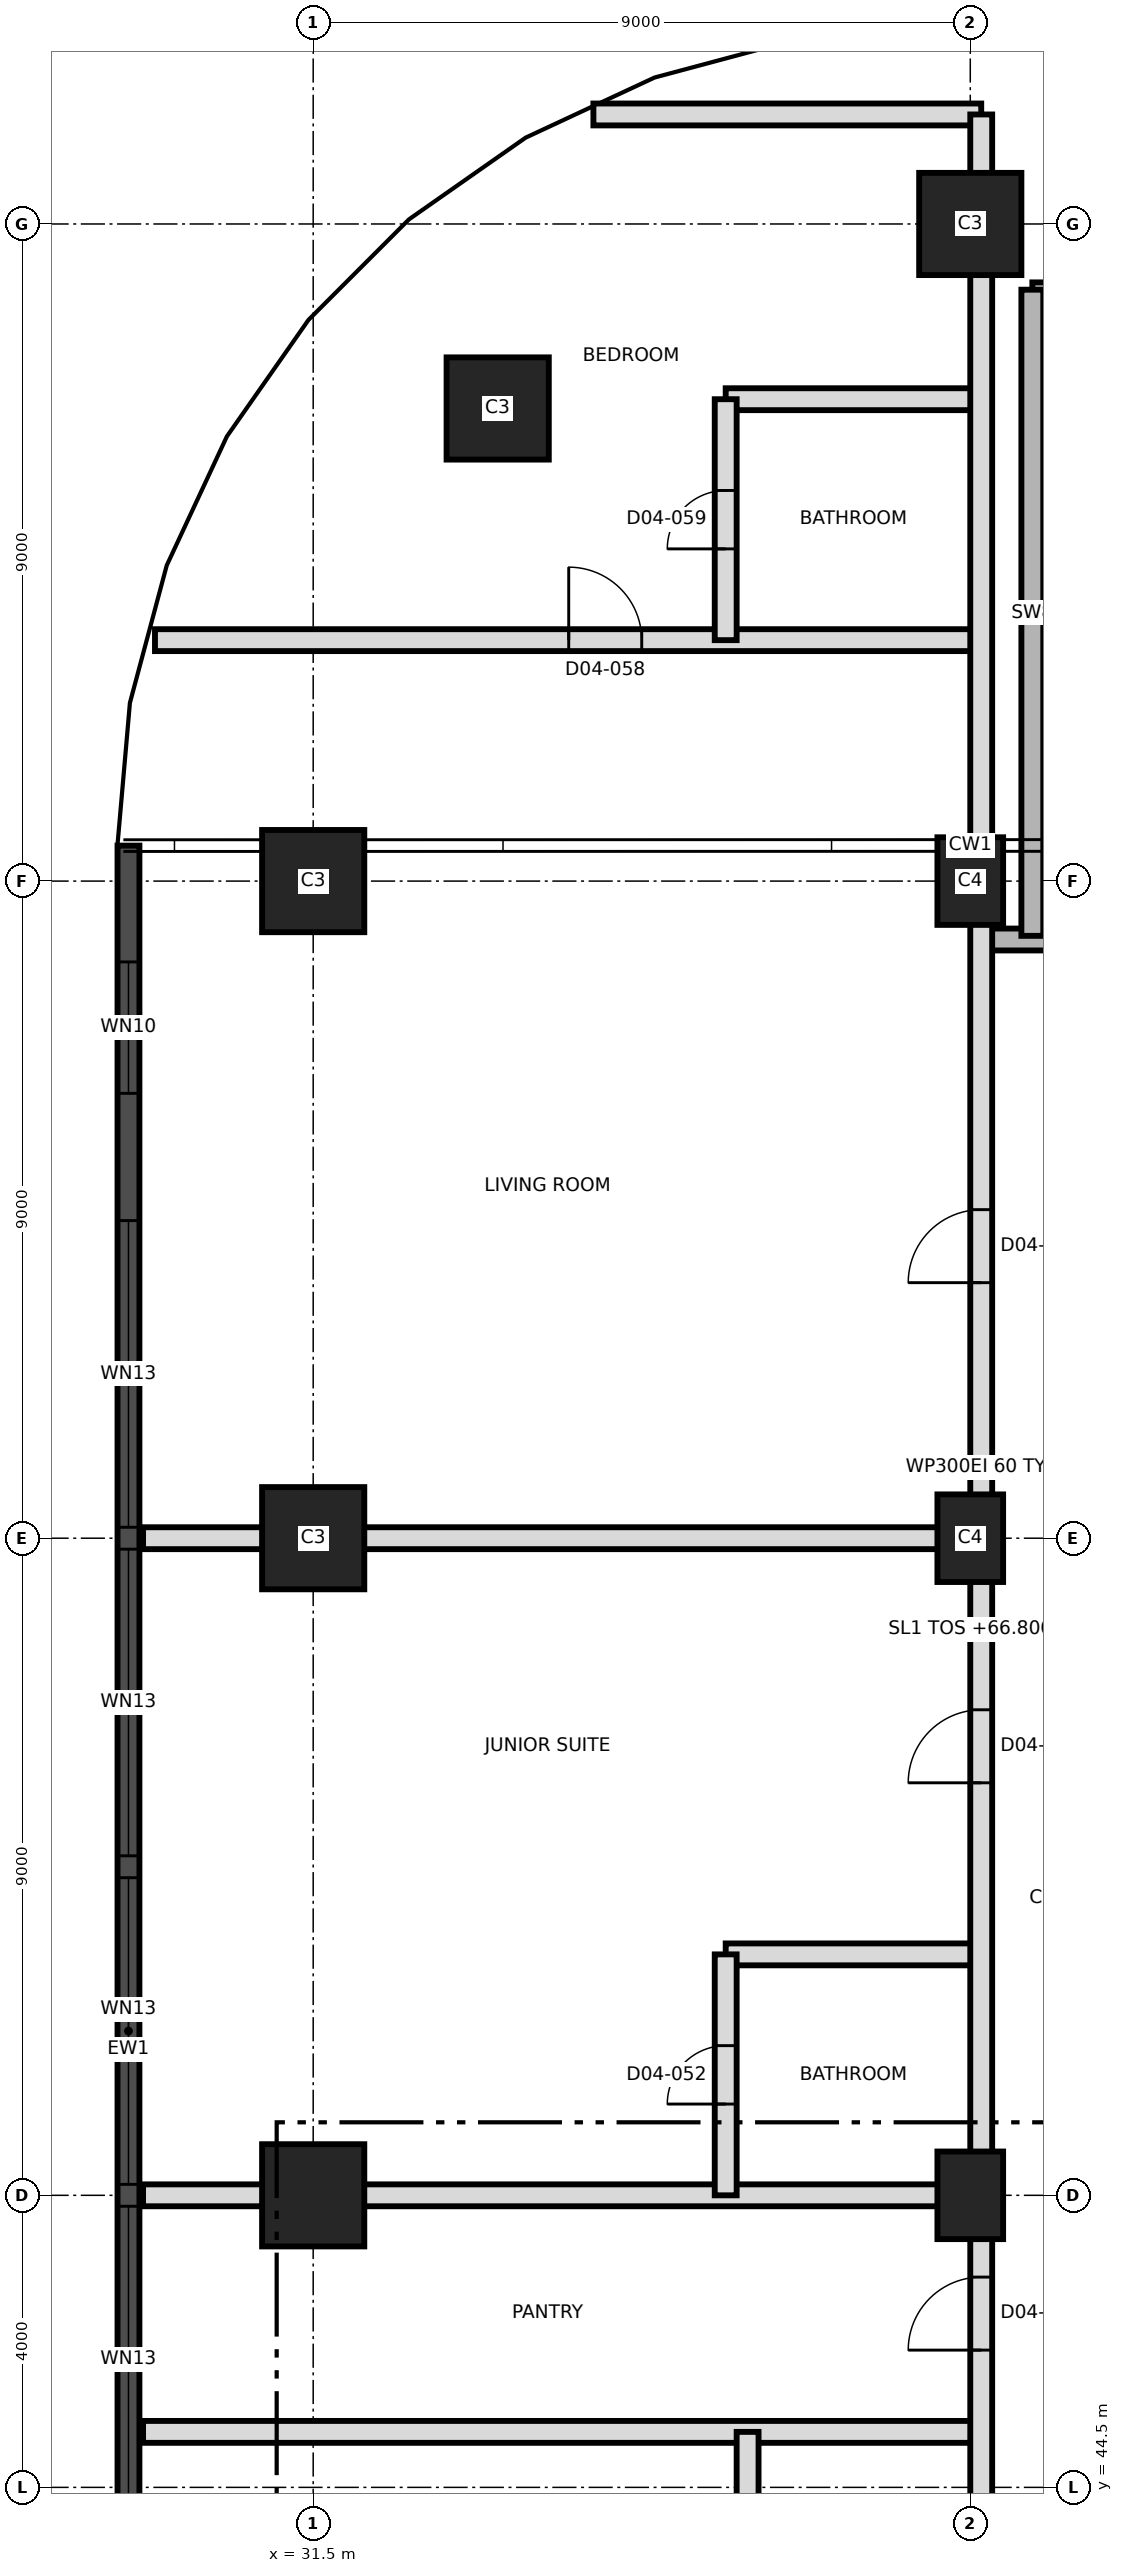
"""IFC4 building model, lengths in metres.
Left out: names, types, materials, properties, quantities, classifications, styles, units other than length and angle.
Written with IfcOpenShell. Run it as: python <this file> out.ifc"""

import sys

from ifc_helpers import new_model, si_unit, direction, frame, frame_2d, origin, origin_2d, place, context, subcontext, project, spatial, rectangle, extrude, element, fill, save


model = new_model("IFC4")
c1 = context("Model", 3, precision=1e-05, world=origin(), true_north=direction((0.0, 1.0)))
c2 = subcontext(c1, "Body", "Model", "MODEL_VIEW")
j1 = project(units=[si_unit("LENGTHUNIT", "METRE"), si_unit("PLANEANGLEUNIT", "RADIAN")], contexts=[c1])
p1 = place(None, origin())
s1 = spatial("IfcSite", under=j1, at=p1, CompositionType="ELEMENT")
p2 = place(p1, origin())
s2 = spatial("IfcBuilding", under=s1, at=p2, CompositionType="ELEMENT")
p3 = place(p2, frame((0.0, 0.0, 66.8)))
s3 = spatial("IfcBuildingStorey", under=s2, at=p3, CompositionType="ELEMENT", Elevation=66.8)
p4 = place(p3, frame((31.5, 48.5, 0.0), z_axis=(0.0, 0.0, 1.0), x_axis=(1.0, 0.0, 0.0)))
e1 = element("IfcColumn", 1, at=p4, inside=s3, PredefinedType="COLUMN", context=c2, shape_type="SweptSolid", body=[
    extrude(rectangle(XDim=1.4, YDim=1.4, at=origin_2d()), origin(), (0.0, 0.0, 1.0), 3.7),
])
p5 = place(p3, frame((40.5, 48.5, 0.0), z_axis=(0.0, 0.0, 1.0), x_axis=(0.0, 1.0, 0.0)))
e2 = element("IfcColumn", 2, at=p5, inside=s3, PredefinedType="COLUMN", context=c2, shape_type="SweptSolid", body=[
    extrude(rectangle(XDim=1.2, YDim=0.9, at=origin_2d()), origin(), (0.0, 0.0, 1.0), 3.7),
])
p6 = place(p3, frame((31.5, 57.5, 0.0), z_axis=(0.0, 0.0, 1.0), x_axis=(1.0, 0.0, 0.0)))
e3 = element("IfcColumn", 3, at=p6, inside=s3, PredefinedType="COLUMN", context=c2, shape_type="SweptSolid", body=[
    extrude(rectangle(XDim=1.4, YDim=1.4, at=origin_2d()), origin(), (0.0, 0.0, 1.0), 3.7),
])
p7 = place(p3, frame((40.5, 57.5, 0.0), z_axis=(0.0, 0.0, 1.0), x_axis=(0.0, 1.0, 0.0)))
e4 = element("IfcColumn", 4, at=p7, inside=s3, PredefinedType="COLUMN", context=c2, shape_type="SweptSolid", body=[
    extrude(rectangle(XDim=1.2, YDim=0.9, at=origin_2d()), origin(), (0.0, 0.0, 1.0), 3.7),
])
p8 = place(p3, frame((31.5, 66.5, 0.0), z_axis=(0.0, 0.0, 1.0), x_axis=(1.0, 0.0, 0.0)))
e5 = element("IfcColumn", 5, at=p8, inside=s3, PredefinedType="COLUMN", context=c2, shape_type="SweptSolid", body=[
    extrude(rectangle(XDim=1.4, YDim=1.4, at=origin_2d()), origin(), (0.0, 0.0, 1.0), 3.7),
])
p9 = place(p3, frame((40.5, 66.5, 0.0), z_axis=(0.0, 0.0, 1.0), x_axis=(0.0, 1.0, 0.0)))
e6 = element("IfcColumn", 6, at=p9, inside=s3, PredefinedType="COLUMN", context=c2, shape_type="SweptSolid", body=[
    extrude(rectangle(XDim=1.2, YDim=0.9, at=origin_2d()), origin(), (0.0, 0.0, 1.0), 3.7),
])
for number, where, z_axis, x_axis in (
    (7, (34.027, 72.973, 0.0), (0.0, 0.0, 1.0), (1.0, 0.0, 0.0)),
    (8, (40.5, 75.5, 0.0), (0.0, 0.0, 1.0), (1.0, 0.0, 0.0)),
):
    element("IfcColumn", number, at=place(p3, frame(where, z_axis=z_axis, x_axis=x_axis)), inside=s3, PredefinedType="COLUMN", context=c2, shape_type="SweptSolid", body=[
        extrude(rectangle(XDim=1.4, YDim=1.4, at=origin_2d()), origin(), (0.0, 0.0, 1.0), 3.7),
    ])
p10 = place(p3, frame((28.97, 66.986, 0.0), z_axis=(0.0, 0.0, 1.0), x_axis=(0.0, -1.0, 0.0)))
e9 = element("IfcWall", 9, at=p10, inside=s3, PredefinedType="SOLIDWALL", context=c2, shape_type="SweptSolid", body=[
    extrude(rectangle(XDim=32.976, YDim=0.3, at=frame_2d((16.488, 0.0))), origin(), (0.0, 0.0, 1.0), 3.4),
])
p11 = place(p10, frame((1.593, 0.0, 0.3)))
e10 = element("IfcOpeningElement", 10, at=p11, cuts=e9, PredefinedType="OPENING", context=c2, shape_type="SweptSolid", body=[
    extrude(rectangle(XDim=1.8, YDim=2.4, at=frame_2d((0.9, 1.2))), frame((0.0, 0.16, 0.0), z_axis=(0.0, -1.0, 0.0), x_axis=(1.0, 0.0, 0.0)), (0.0, 0.0, 1.0), 0.32),
])
p12 = place(p10, frame((5.136, 0.0, 0.9)))
e11 = element("IfcOpeningElement", 11, at=p12, cuts=e9, PredefinedType="OPENING", context=c2, shape_type="SweptSolid", body=[
    extrude(rectangle(XDim=4.2, YDim=1.7, at=frame_2d((2.1, 0.85))), frame((0.0, 0.16, 0.0), z_axis=(0.0, -1.0, 0.0), x_axis=(1.0, 0.0, 0.0)), (0.0, 0.0, 1.0), 0.32),
])
p13 = place(p10, frame((9.636, 0.0, 0.9)))
e12 = element("IfcOpeningElement", 12, at=p13, cuts=e9, PredefinedType="OPENING", context=c2, shape_type="SweptSolid", body=[
    extrude(rectangle(XDim=4.2, YDim=1.7, at=frame_2d((2.1, 0.85))), frame((0.0, 0.16, 0.0), z_axis=(0.0, -1.0, 0.0), x_axis=(1.0, 0.0, 0.0)), (0.0, 0.0, 1.0), 0.32),
])
p14 = place(p10, frame((14.136, 0.0, 0.9)))
e13 = element("IfcOpeningElement", 13, at=p14, cuts=e9, PredefinedType="OPENING", context=c2, shape_type="SweptSolid", body=[
    extrude(rectangle(XDim=4.2, YDim=1.7, at=frame_2d((2.1, 0.85))), frame((0.0, 0.16, 0.0), z_axis=(0.0, -1.0, 0.0), x_axis=(1.0, 0.0, 0.0)), (0.0, 0.0, 1.0), 0.32),
])
p15 = place(p10, frame((18.636, 0.0, 0.9)))
e14 = element("IfcOpeningElement", 14, at=p15, cuts=e9, PredefinedType="OPENING", context=c2, shape_type="SweptSolid", body=[
    extrude(rectangle(XDim=4.2, YDim=1.7, at=frame_2d((2.1, 0.85))), frame((0.0, 0.16, 0.0), z_axis=(0.0, -1.0, 0.0), x_axis=(1.0, 0.0, 0.0)), (0.0, 0.0, 1.0), 0.32),
])
p16 = place(p10, frame((23.136, 0.0, 0.9)))
e15 = element("IfcOpeningElement", 15, at=p16, cuts=e9, PredefinedType="OPENING", context=c2, shape_type="SweptSolid", body=[
    extrude(rectangle(XDim=4.2, YDim=1.7, at=frame_2d((2.1, 0.85))), frame((0.0, 0.16, 0.0), z_axis=(0.0, -1.0, 0.0), x_axis=(1.0, 0.0, 0.0)), (0.0, 0.0, 1.0), 0.32),
])
p17 = place(p10, frame((29.331, 0.0, 0.3)))
e16 = element("IfcOpeningElement", 16, at=p17, cuts=e9, PredefinedType="OPENING", context=c2, shape_type="SweptSolid", body=[
    extrude(rectangle(XDim=1.8, YDim=2.4, at=frame_2d((0.9, 1.2))), frame((0.0, 0.16, 0.0), z_axis=(0.0, -1.0, 0.0), x_axis=(1.0, 0.0, 0.0)), (0.0, 0.0, 1.0), 0.32),
])
for number, where, z_axis, x_axis in (
    (17, (29.17, 45.26, 0.0), (0.0, 0.0, 1.0), (1.0, 0.0, 0.0)),
    (18, (29.17, 48.5, 0.0), (0.0, 0.0, 1.0), (1.0, 0.0, 0.0)),
):
    element("IfcWall", number, at=place(p3, frame(where, z_axis=z_axis, x_axis=x_axis)), inside=s3, PredefinedType="PARTITIONING", context=c2, shape_type="SweptSolid", body=[
        extrude(rectangle(XDim=11.48, YDim=0.3, at=frame_2d((5.74, 0.0))), origin(), (0.0, 0.0, 1.0), 3.35),
    ])
p18 = place(p3, frame((37.15, 51.8, 0.0), z_axis=(0.0, 0.0, 1.0), x_axis=(1.0, 0.0, 0.0)))
e19 = element("IfcWall", 19, at=p18, inside=s3, PredefinedType="PARTITIONING", context=c2, shape_type="SweptSolid", body=[
    extrude(rectangle(XDim=3.5, YDim=0.3, at=frame_2d((1.75, 0.0))), origin(), (0.0, 0.0, 1.0), 3.4),
])
p19 = place(p3, frame((29.17, 57.5, 0.0), z_axis=(0.0, 0.0, 1.0), x_axis=(1.0, 0.0, 0.0)))
e20 = element("IfcWall", 20, at=p19, inside=s3, PredefinedType="PARTITIONING", context=c2, shape_type="SweptSolid", body=[
    extrude(rectangle(XDim=11.48, YDim=0.3, at=frame_2d((5.74, 0.0))), origin(), (0.0, 0.0, 1.0), 3.35),
])
p20 = place(p3, frame((40.65, 65.7, 0.0), z_axis=(0.0, 0.0, 1.0), x_axis=(1.0, 0.0, 0.0)))
e21 = element("IfcWall", 21, at=p20, inside=s3, PredefinedType="SHEAR", context=c2, shape_type="SweptSolid", body=[
    extrude(rectangle(XDim=6.2, YDim=0.3, at=frame_2d((3.1, 0.0))), origin(), (0.0, 0.0, 1.0), 3.4),
])
p21 = place(p20, frame((1.1, 0.0, 0.0)))
e22 = element("IfcOpeningElement", 22, at=p21, cuts=e21, PredefinedType="OPENING", context=c2, shape_type="SweptSolid", body=[
    extrude(rectangle(XDim=1.2, YDim=2.1, at=frame_2d((0.6, 1.05))), frame((0.0, 0.16, 0.0), z_axis=(0.0, -1.0, 0.0), x_axis=(1.0, 0.0, 0.0)), (0.0, 0.0, 1.0), 0.32),
])
p22 = place(p3, frame((29.333, 69.8, 0.0), z_axis=(0.0, 0.0, 1.0), x_axis=(1.0, 0.0, 0.0)))
e23 = element("IfcWall", 23, at=p22, inside=s3, PredefinedType="PARTITIONING", context=c2, shape_type="SweptSolid", body=[
    extrude(rectangle(XDim=11.317, YDim=0.3, at=frame_2d((5.658, 0.0))), origin(), (0.0, 0.0, 1.0), 3.35),
])
p23 = place(p22, frame((5.667, 0.0, 0.0)))
e24 = element("IfcOpeningElement", 24, at=p23, cuts=e23, PredefinedType="OPENING", context=c2, shape_type="SweptSolid", body=[
    extrude(rectangle(XDim=1.0, YDim=2.1, at=frame_2d((0.5, 1.05))), frame((0.0, 0.16, 0.0), z_axis=(0.0, -1.0, 0.0), x_axis=(1.0, 0.0, 0.0)), (0.0, 0.0, 1.0), 0.32),
])
p24 = place(p3, frame((37.15, 73.1, 0.0), z_axis=(0.0, 0.0, 1.0), x_axis=(1.0, 0.0, 0.0)))
e25 = element("IfcWall", 25, at=p24, inside=s3, PredefinedType="PARTITIONING", context=c2, shape_type="SweptSolid", body=[
    extrude(rectangle(XDim=3.5, YDim=0.3, at=frame_2d((1.75, 0.0))), origin(), (0.0, 0.0, 1.0), 3.4),
])
p25 = place(p3, frame((41.35, 74.55, 0.0), z_axis=(0.0, 0.0, 1.0), x_axis=(1.0, 0.0, 0.0)))
e26 = element("IfcWall", 26, at=p25, inside=s3, PredefinedType="SHEAR", context=c2, shape_type="SweptSolid", body=[
    extrude(rectangle(XDim=3.0, YDim=0.3, at=frame_2d((1.5, 0.0))), origin(), (0.0, 0.0, 1.0), 3.4),
])
p26 = place(p3, frame((35.338, 77.0, 0.0), z_axis=(0.0, 0.0, 1.0), x_axis=(1.0, 0.0, 0.0)))
e27 = element("IfcWall", 27, at=p26, inside=s3, PredefinedType="PARTITIONING", context=c2, shape_type="SweptSolid", body=[
    extrude(rectangle(XDim=5.312, YDim=0.3, at=frame_2d((2.656, 0.0))), origin(), (0.0, 0.0, 1.0), 3.35),
])
p27 = place(p3, frame((37.15, 48.5, 0.0), z_axis=(0.0, 0.0, 1.0), x_axis=(0.0, 1.0, 0.0)))
e28 = element("IfcWall", 28, at=p27, inside=s3, PredefinedType="PARTITIONING", context=c2, shape_type="SweptSolid", body=[
    extrude(rectangle(XDim=3.3, YDim=0.3, at=frame_2d((1.65, 0.0))), origin(), (0.0, 0.0, 1.0), 3.4),
])
p28 = place(p27, frame((1.25, 0.0, 0.0)))
e29 = element("IfcOpeningElement", 29, at=p28, cuts=e28, PredefinedType="OPENING", context=c2, shape_type="SweptSolid", body=[
    extrude(rectangle(XDim=0.8, YDim=2.1, at=frame_2d((0.4, 1.05))), frame((0.0, 0.16, 0.0), z_axis=(0.0, -1.0, 0.0), x_axis=(1.0, 0.0, 0.0)), (0.0, 0.0, 1.0), 0.32),
])
p29 = place(p3, frame((37.15, 69.8, 0.0), z_axis=(0.0, 0.0, 1.0), x_axis=(0.0, 1.0, 0.0)))
e30 = element("IfcWall", 30, at=p29, inside=s3, PredefinedType="PARTITIONING", context=c2, shape_type="SweptSolid", body=[
    extrude(rectangle(XDim=3.3, YDim=0.3, at=frame_2d((1.65, 0.0))), origin(), (0.0, 0.0, 1.0), 3.4),
])
p30 = place(p29, frame((1.25, 0.0, 0.0)))
e31 = element("IfcOpeningElement", 31, at=p30, cuts=e30, PredefinedType="OPENING", context=c2, shape_type="SweptSolid", body=[
    extrude(rectangle(XDim=0.8, YDim=2.1, at=frame_2d((0.4, 1.05))), frame((0.0, 0.16, 0.0), z_axis=(0.0, -1.0, 0.0), x_axis=(1.0, 0.0, 0.0)), (0.0, 0.0, 1.0), 0.32),
])
p31 = place(p3, frame((37.45, 42.56, 0.0), z_axis=(0.0, 0.0, 1.0), x_axis=(0.0, 1.0, 0.0)))
e32 = element("IfcWall", 32, at=p31, inside=s3, PredefinedType="PARTITIONING", context=c2, shape_type="SweptSolid", body=[
    extrude(rectangle(XDim=2.7, YDim=0.3, at=frame_2d((1.35, 0.0))), origin(), (0.0, 0.0, 1.0), 3.4),
])
p32 = place(p31, frame((0.95, 0.0, 0.0)))
e33 = element("IfcOpeningElement", 33, at=p32, cuts=e32, PredefinedType="OPENING", context=c2, shape_type="SweptSolid", body=[
    extrude(rectangle(XDim=0.8, YDim=2.1, at=frame_2d((0.4, 1.05))), frame((0.0, 0.16, 0.0), z_axis=(0.0, -1.0, 0.0), x_axis=(1.0, 0.0, 0.0)), (0.0, 0.0, 1.0), 0.32),
])
p33 = place(p3, frame((40.65, 39.95, 0.0), z_axis=(0.0, 0.0, 1.0), x_axis=(0.0, 1.0, 0.0)))
e34 = element("IfcWall", 34, at=p33, inside=s3, PredefinedType="PARTITIONING", context=c2, shape_type="SweptSolid", body=[
    extrude(rectangle(XDim=37.05, YDim=0.3, at=frame_2d((18.525, 0.0))), origin(), (0.0, 0.0, 1.0), 3.35),
])
p34 = place(p33, frame((0.58, 0.0, 0.0)))
e35 = element("IfcOpeningElement", 35, at=p34, cuts=e34, PredefinedType="OPENING", context=c2, shape_type="SweptSolid", body=[
    extrude(rectangle(XDim=1.0, YDim=2.1, at=frame_2d((0.5, 1.05))), frame((0.0, 0.16, 0.0), z_axis=(0.0, -1.0, 0.0), x_axis=(1.0, 0.0, 0.0)), (0.0, 0.0, 1.0), 0.32),
])
p35 = place(p33, frame((6.43, 0.0, 0.0)))
e36 = element("IfcOpeningElement", 36, at=p35, cuts=e34, PredefinedType="OPENING", context=c2, shape_type="SweptSolid", body=[
    extrude(rectangle(XDim=1.0, YDim=2.1, at=frame_2d((0.5, 1.05))), frame((0.0, 0.16, 0.0), z_axis=(0.0, -1.0, 0.0), x_axis=(1.0, 0.0, 0.0)), (0.0, 0.0, 1.0), 0.32),
])
p36 = place(p33, frame((14.2, 0.0, 0.0)))
e37 = element("IfcOpeningElement", 37, at=p36, cuts=e34, PredefinedType="OPENING", context=c2, shape_type="SweptSolid", body=[
    extrude(rectangle(XDim=1.0, YDim=2.4, at=frame_2d((0.5, 1.2))), frame((0.0, 0.16, 0.0), z_axis=(0.0, -1.0, 0.0), x_axis=(1.0, 0.0, 0.0)), (0.0, 0.0, 1.0), 0.32),
])
p37 = place(p33, frame((21.05, 0.0, 0.0)))
e38 = element("IfcOpeningElement", 38, at=p37, cuts=e34, PredefinedType="OPENING", context=c2, shape_type="SweptSolid", body=[
    extrude(rectangle(XDim=1.0, YDim=2.4, at=frame_2d((0.5, 1.2))), frame((0.0, 0.16, 0.0), z_axis=(0.0, -1.0, 0.0), x_axis=(1.0, 0.0, 0.0)), (0.0, 0.0, 1.0), 0.32),
])
p38 = place(p3, frame((41.35, 65.75, 0.0), z_axis=(0.0, 0.0, 1.0), x_axis=(0.0, 1.0, 0.0)))
e39 = element("IfcWall", 39, at=p38, inside=s3, PredefinedType="SHEAR", context=c2, shape_type="SweptSolid", body=[
    extrude(rectangle(XDim=8.85, YDim=0.3, at=frame_2d((4.425, 0.0))), origin(), (0.0, 0.0, 1.0), 3.4),
])
p39 = place(p11, origin())
e40 = element("IfcWindow", 40, at=p39, inside=s3, PartitioningType="SINGLE_PANEL", PredefinedType="WINDOW", context=c2, shape_type="SweptSolid", body=[
    extrude(rectangle(XDim=1.8, YDim=2.4, at=frame_2d((0.9, 1.2))), frame((0.0, 0.03, 0.0), z_axis=(0.0, -1.0, 0.0), x_axis=(1.0, 0.0, 0.0)), (0.0, 0.0, 1.0), 0.06),
])
fill(e10, e40)
p40 = place(p12, origin())
e41 = element("IfcWindow", 41, at=p40, inside=s3, PartitioningType="SINGLE_PANEL", PredefinedType="WINDOW", context=c2, shape_type="SweptSolid", body=[
    extrude(rectangle(XDim=4.2, YDim=1.7, at=frame_2d((2.1, 0.85))), frame((0.0, 0.03, 0.0), z_axis=(0.0, -1.0, 0.0), x_axis=(1.0, 0.0, 0.0)), (0.0, 0.0, 1.0), 0.06),
])
fill(e11, e41)
p41 = place(p13, origin())
e42 = element("IfcWindow", 42, at=p41, inside=s3, PartitioningType="SINGLE_PANEL", PredefinedType="WINDOW", context=c2, shape_type="SweptSolid", body=[
    extrude(rectangle(XDim=4.2, YDim=1.7, at=frame_2d((2.1, 0.85))), frame((0.0, 0.03, 0.0), z_axis=(0.0, -1.0, 0.0), x_axis=(1.0, 0.0, 0.0)), (0.0, 0.0, 1.0), 0.06),
])
fill(e12, e42)
p42 = place(p14, origin())
e43 = element("IfcWindow", 43, at=p42, inside=s3, PartitioningType="SINGLE_PANEL", PredefinedType="WINDOW", context=c2, shape_type="SweptSolid", body=[
    extrude(rectangle(XDim=4.2, YDim=1.7, at=frame_2d((2.1, 0.85))), frame((0.0, 0.03, 0.0), z_axis=(0.0, -1.0, 0.0), x_axis=(1.0, 0.0, 0.0)), (0.0, 0.0, 1.0), 0.06),
])
fill(e13, e43)
p43 = place(p15, origin())
e44 = element("IfcWindow", 44, at=p43, inside=s3, PartitioningType="SINGLE_PANEL", PredefinedType="WINDOW", context=c2, shape_type="SweptSolid", body=[
    extrude(rectangle(XDim=4.2, YDim=1.7, at=frame_2d((2.1, 0.85))), frame((0.0, 0.03, 0.0), z_axis=(0.0, -1.0, 0.0), x_axis=(1.0, 0.0, 0.0)), (0.0, 0.0, 1.0), 0.06),
])
fill(e14, e44)
p44 = place(p35, origin())
e45 = element("IfcDoor", 45, at=p44, inside=s3, OperationType="SINGLE_SWING_LEFT", PredefinedType="DOOR", context=c2, shape_type="SweptSolid", body=[
    extrude(rectangle(XDim=1.0, YDim=2.1, at=frame_2d((0.5, 1.05))), frame((0.0, 0.025, 0.0), z_axis=(0.0, -1.0, 0.0), x_axis=(1.0, 0.0, 0.0)), (0.0, 0.0, 1.0), 0.05),
])
fill(e36, e45)
p45 = place(p28, origin())
e46 = element("IfcDoor", 46, at=p45, inside=s3, OperationType="SINGLE_SWING_LEFT", PredefinedType="DOOR", context=c2, shape_type="SweptSolid", body=[
    extrude(rectangle(XDim=0.8, YDim=2.1, at=frame_2d((0.4, 1.05))), frame((0.0, 0.025, 0.0), z_axis=(0.0, -1.0, 0.0), x_axis=(1.0, 0.0, 0.0)), (0.0, 0.0, 1.0), 0.05),
])
fill(e29, e46)
p46 = place(p36, origin())
e47 = element("IfcDoor", 47, at=p46, inside=s3, OperationType="SINGLE_SWING_RIGHT", PredefinedType="DOOR", context=c2, shape_type="SweptSolid", body=[
    extrude(rectangle(XDim=1.0, YDim=2.4, at=frame_2d((0.5, 1.2))), frame((0.0, 0.025, 0.0), z_axis=(0.0, -1.0, 0.0), x_axis=(1.0, 0.0, 0.0)), (0.0, 0.0, 1.0), 0.05),
])
fill(e37, e47)
p47 = place(p37, origin())
e48 = element("IfcDoor", 48, at=p47, inside=s3, OperationType="SINGLE_SWING_LEFT", PredefinedType="DOOR", context=c2, shape_type="SweptSolid", body=[
    extrude(rectangle(XDim=1.0, YDim=2.4, at=frame_2d((0.5, 1.2))), frame((0.0, 0.025, 0.0), z_axis=(0.0, -1.0, 0.0), x_axis=(1.0, 0.0, 0.0)), (0.0, 0.0, 1.0), 0.05),
])
fill(e38, e48)
p48 = place(p23, origin())
e49 = element("IfcDoor", 49, at=p48, inside=s3, OperationType="SINGLE_SWING_RIGHT", PredefinedType="DOOR", context=c2, shape_type="SweptSolid", body=[
    extrude(rectangle(XDim=1.0, YDim=2.1, at=frame_2d((0.5, 1.05))), frame((0.0, 0.025, 0.0), z_axis=(0.0, -1.0, 0.0), x_axis=(1.0, 0.0, 0.0)), (0.0, 0.0, 1.0), 0.05),
])
fill(e24, e49)
p49 = place(p30, origin())
e50 = element("IfcDoor", 50, at=p49, inside=s3, OperationType="SINGLE_SWING_LEFT", PredefinedType="DOOR", context=c2, shape_type="SweptSolid", body=[
    extrude(rectangle(XDim=0.8, YDim=2.1, at=frame_2d((0.4, 1.05))), frame((0.0, 0.025, 0.0), z_axis=(0.0, -1.0, 0.0), x_axis=(1.0, 0.0, 0.0)), (0.0, 0.0, 1.0), 0.05),
])
fill(e31, e50)
save(model, sys.argv[1])
